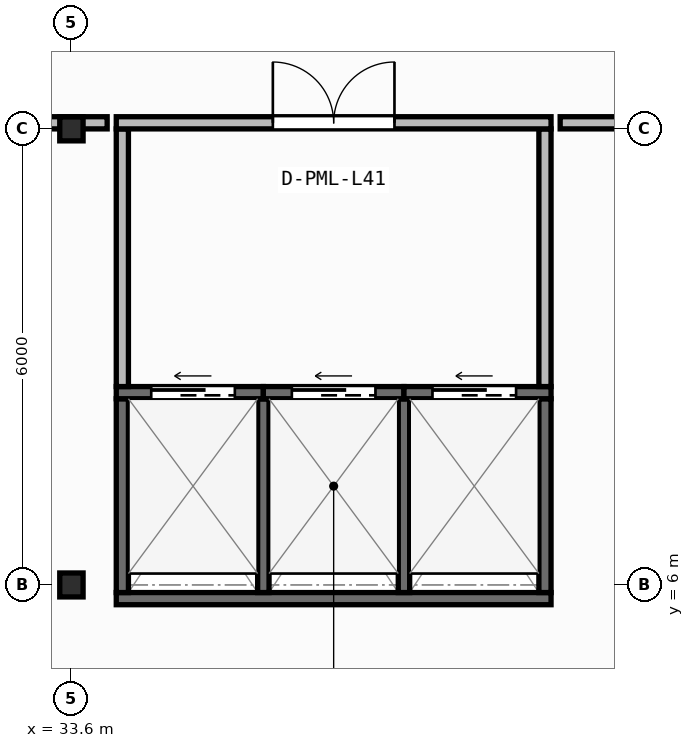
"""IFC4 building model, lengths in metres.
Left out: names, types, materials, properties, quantities, classifications, styles, units other than length and angle.
Written with IfcOpenShell. Run it as: python <this file> out.ifc"""

import sys

from ifc_helpers import new_model, si_unit, direction, frame, frame_2d, origin, origin_2d, place, context, subcontext, project, spatial, rectangle, i_section, extrude, element, fill, save


model = new_model("IFC4")
c1 = context("Model", 3, precision=1e-05, world=origin(), true_north=direction((0.0, 1.0)))
c2 = subcontext(c1, "Body", "Model", "MODEL_VIEW")
j1 = project(units=[si_unit("LENGTHUNIT", "METRE"), si_unit("PLANEANGLEUNIT", "RADIAN")], contexts=[c1])
p1 = place(None, origin())
s1 = spatial("IfcSite", under=j1, at=p1, CompositionType="ELEMENT")
p2 = place(p1, origin())
s2 = spatial("IfcBuilding", under=s1, at=p2, CompositionType="ELEMENT")
p3 = place(p2, frame((0.0, 0.0, 166.55)))
s3 = spatial("IfcBuildingStorey", under=s2, at=p3, CompositionType="ELEMENT", Elevation=166.55)
for number, where, z_axis, x_axis in (
    (1, (33.6, 6.0, 0.0), (0.0, 0.0, 1.0), (1.0, 0.0, 0.0)),
    (2, (33.6, 12.0, 0.0), (0.0, 0.0, 1.0), (1.0, 0.0, 0.0)),
):
    element("IfcColumn", number, at=place(p3, frame(where, z_axis=z_axis, x_axis=x_axis)), inside=s3, PredefinedType="COLUMN", context=c2, shape_type="SweptSolid", body=[
        extrude(i_section(OverallWidth=0.307, OverallDepth=0.315, WebThickness=0.012, FlangeThickness=0.019, FilletRadius=0.017, at=origin_2d()), origin(), (0.0, 0.0, 1.0), 3.95),
    ])
p4 = place(p3, frame((34.19, 5.82, 0.0), z_axis=(0.0, 0.0, 1.0), x_axis=(1.0, 0.0, 0.0)))
e3 = element("IfcWall", 3, at=p4, inside=s3, PredefinedType="SHEAR", context=c2, shape_type="SweptSolid", body=[
    extrude(rectangle(XDim=5.72, YDim=0.16, at=frame_2d((2.86, 0.0))), origin(), (0.0, 0.0, 1.0), 3.71),
])
for number, where, z_axis, x_axis in (
    (4, (34.27, 5.9, 0.0), (0.0, 0.0, 1.0), (0.0, 1.0, 0.0)),
    (5, (39.83, 5.9, 0.0), (0.0, 0.0, 1.0), (0.0, 1.0, 0.0)),
):
    element("IfcWall", number, at=place(p3, frame(where, z_axis=z_axis, x_axis=x_axis)), inside=s3, PredefinedType="SHEAR", context=c2, shape_type="SweptSolid", body=[
        extrude(rectangle(XDim=2.55, YDim=0.16, at=frame_2d((1.275, 0.0))), origin(), (0.0, 0.0, 1.0), 3.71),
    ])
for number, where, z_axis, x_axis in (
    (6, (36.125, 5.9, 0.0), (0.0, 0.0, 1.0), (0.0, 1.0, 0.0)),
    (7, (37.975, 5.9, 0.0), (0.0, 0.0, 1.0), (0.0, 1.0, 0.0)),
):
    element("IfcWall", number, at=place(p3, frame(where, z_axis=z_axis, x_axis=x_axis)), inside=s3, PredefinedType="SHEAR", context=c2, shape_type="SweptSolid", body=[
        extrude(rectangle(XDim=2.55, YDim=0.15, at=frame_2d((1.275, 0.0))), origin(), (0.0, 0.0, 1.0), 3.71),
    ])
p5 = place(p3, frame((34.19, 8.53, 0.0), z_axis=(0.0, 0.0, 1.0), x_axis=(1.0, 0.0, 0.0)))
e8 = element("IfcWall", 8, at=p5, inside=s3, PredefinedType="SHEAR", context=c2, shape_type="SweptSolid", body=[
    extrude(rectangle(XDim=1.935, YDim=0.16, at=frame_2d((0.968, 0.0))), origin(), (0.0, 0.0, 1.0), 3.71),
])
p6 = place(p5, frame((0.46, 0.0, 0.0)))
e9 = element("IfcOpeningElement", 9, at=p6, cuts=e8, PredefinedType="OPENING", context=c2, shape_type="SweptSolid", body=[
    extrude(rectangle(XDim=1.1, YDim=2.15, at=frame_2d((0.55, 1.075))), frame((0.0, 0.09, 0.0), z_axis=(0.0, -1.0, 0.0), x_axis=(1.0, 0.0, 0.0)), (0.0, 0.0, 1.0), 0.18),
])
p7 = place(p3, frame((36.125, 8.53, 0.0), z_axis=(0.0, 0.0, 1.0), x_axis=(1.0, 0.0, 0.0)))
e10 = element("IfcWall", 10, at=p7, inside=s3, PredefinedType="SHEAR", context=c2, shape_type="SweptSolid", body=[
    extrude(rectangle(XDim=1.85, YDim=0.16, at=frame_2d((0.925, 0.0))), origin(), (0.0, 0.0, 1.0), 3.71),
])
p8 = place(p7, frame((0.375, 0.0, 0.0)))
e11 = element("IfcOpeningElement", 11, at=p8, cuts=e10, PredefinedType="OPENING", context=c2, shape_type="SweptSolid", body=[
    extrude(rectangle(XDim=1.1, YDim=2.15, at=frame_2d((0.55, 1.075))), frame((0.0, 0.09, 0.0), z_axis=(0.0, -1.0, 0.0), x_axis=(1.0, 0.0, 0.0)), (0.0, 0.0, 1.0), 0.18),
])
p9 = place(p3, frame((37.975, 8.53, 0.0), z_axis=(0.0, 0.0, 1.0), x_axis=(1.0, 0.0, 0.0)))
e12 = element("IfcWall", 12, at=p9, inside=s3, PredefinedType="SHEAR", context=c2, shape_type="SweptSolid", body=[
    extrude(rectangle(XDim=1.935, YDim=0.16, at=frame_2d((0.967, 0.0))), origin(), (0.0, 0.0, 1.0), 3.71),
])
p10 = place(p9, frame((0.375, 0.0, 0.0)))
e13 = element("IfcOpeningElement", 13, at=p10, cuts=e12, PredefinedType="OPENING", context=c2, shape_type="SweptSolid", body=[
    extrude(rectangle(XDim=1.1, YDim=2.15, at=frame_2d((0.55, 1.075))), frame((0.0, 0.09, 0.0), z_axis=(0.0, -1.0, 0.0), x_axis=(1.0, 0.0, 0.0)), (0.0, 0.0, 1.0), 0.18),
])
for number, where, z_axis, x_axis in (
    (14, (34.27, 8.61, 0.0), (0.0, 0.0, 1.0), (0.0, 1.0, 0.0)),
    (15, (39.83, 8.61, 0.0), (0.0, 0.0, 1.0), (0.0, 1.0, 0.0)),
):
    element("IfcWall", number, at=place(p3, frame(where, z_axis=z_axis, x_axis=x_axis)), inside=s3, PredefinedType="PARTITIONING", context=c2, shape_type="SweptSolid", body=[
        extrude(rectangle(XDim=3.39, YDim=0.16, at=frame_2d((1.695, 0.0))), origin(), (0.0, 0.0, 1.0), 3.71),
    ])
p11 = place(p3, frame((34.19, 12.08, 0.0), z_axis=(0.0, 0.0, 1.0), x_axis=(1.0, 0.0, 0.0)))
e16 = element("IfcWall", 16, at=p11, inside=s3, PredefinedType="PARTITIONING", context=c2, shape_type="SweptSolid", body=[
    extrude(rectangle(XDim=5.72, YDim=0.16, at=frame_2d((2.86, 0.0))), origin(), (0.0, 0.0, 1.0), 3.083),
])
p12 = place(p11, frame((2.06, 0.0, 0.0)))
e17 = element("IfcOpeningElement", 17, at=p12, cuts=e16, PredefinedType="OPENING", context=c2, shape_type="SweptSolid", body=[
    extrude(rectangle(XDim=1.6, YDim=2.05, at=frame_2d((0.8, 1.025))), frame((0.0, 0.09, 0.0), z_axis=(0.0, -1.0, 0.0), x_axis=(1.0, 0.0, 0.0)), (0.0, 0.0, 1.0), 0.18),
])
p13 = place(p3, frame((31.439, 12.08, 0.0), z_axis=(0.0, 0.0, 1.0), x_axis=(1.0, 0.0, 0.0)))
e18 = element("IfcWall", 18, at=p13, inside=s3, PredefinedType="PARTITIONING", context=c2, shape_type="SweptSolid", body=[
    extrude(rectangle(XDim=2.631, YDim=0.16, at=frame_2d((1.315, 0.0))), origin(), (0.0, 0.0, 1.0), 3.083),
])
p14 = place(p3, frame((40.03, 12.08, 0.0), z_axis=(0.0, 0.0, 1.0), x_axis=(1.0, 0.0, 0.0)))
e19 = element("IfcWall", 19, at=p14, inside=s3, PredefinedType="PARTITIONING", context=c2, shape_type="SweptSolid", body=[
    extrude(rectangle(XDim=2.781, YDim=0.16, at=frame_2d((1.39, 0.0))), origin(), (0.0, 0.0, 1.0), 3.083),
])
p15 = place(p6, origin())
e20 = element("IfcDoor", 20, at=p15, inside=s3, OperationType="SLIDING_TO_LEFT", PredefinedType="DOOR", context=c2, shape_type="SweptSolid", body=[
    extrude(rectangle(XDim=1.1, YDim=2.15, at=frame_2d((0.55, 1.075))), frame((0.0, 0.025, 0.0), z_axis=(0.0, -1.0, 0.0), x_axis=(1.0, 0.0, 0.0)), (0.0, 0.0, 1.0), 0.05),
])
fill(e9, e20)
p16 = place(p8, origin())
e21 = element("IfcDoor", 21, at=p16, inside=s3, OperationType="SLIDING_TO_LEFT", PredefinedType="DOOR", context=c2, shape_type="SweptSolid", body=[
    extrude(rectangle(XDim=1.1, YDim=2.15, at=frame_2d((0.55, 1.075))), frame((0.0, 0.025, 0.0), z_axis=(0.0, -1.0, 0.0), x_axis=(1.0, 0.0, 0.0)), (0.0, 0.0, 1.0), 0.05),
])
fill(e11, e21)
p17 = place(p10, origin())
e22 = element("IfcDoor", 22, at=p17, inside=s3, OperationType="SLIDING_TO_LEFT", PredefinedType="DOOR", context=c2, shape_type="SweptSolid", body=[
    extrude(rectangle(XDim=1.1, YDim=2.15, at=frame_2d((0.55, 1.075))), frame((0.0, 0.025, 0.0), z_axis=(0.0, -1.0, 0.0), x_axis=(1.0, 0.0, 0.0)), (0.0, 0.0, 1.0), 0.05),
])
fill(e13, e22)
p18 = place(p12, origin())
e23 = element("IfcDoor", 23, at=p18, inside=s3, OperationType="DOUBLE_DOOR_SINGLE_SWING", PredefinedType="DOOR", context=c2, shape_type="SweptSolid", body=[
    extrude(rectangle(XDim=1.6, YDim=2.05, at=frame_2d((0.8, 1.025))), frame((0.0, 0.025, 0.0), z_axis=(0.0, -1.0, 0.0), x_axis=(1.0, 0.0, 0.0)), (0.0, 0.0, 1.0), 0.05),
])
fill(e17, e23)
save(model, sys.argv[1])
